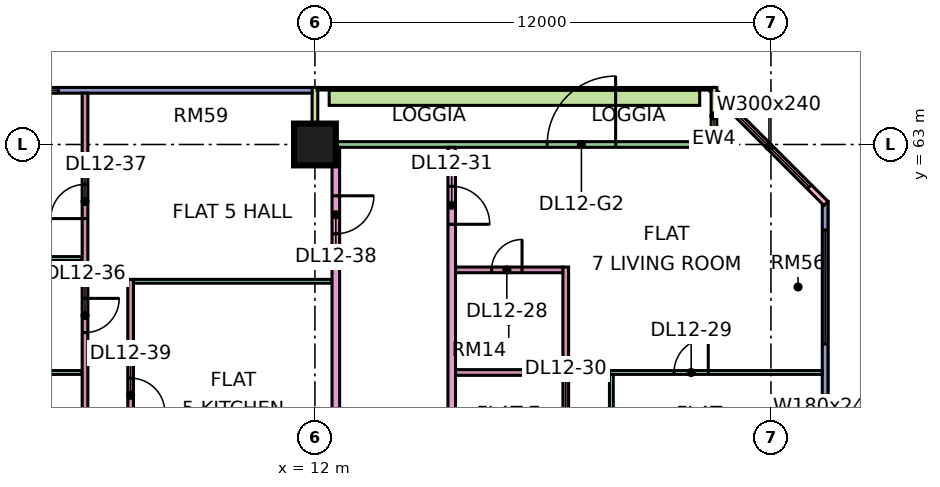
"""IFC4 building model, lengths in metres.
Left out: names, types, materials, properties, quantities, classifications, styles, units other than length and angle.
Written with IfcOpenShell. Run it as: python <this file> out.ifc"""

import sys

from ifc_helpers import new_model, si_unit, direction, frame, frame_2d, origin, origin_2d, place, context, subcontext, project, spatial, rectangle, extrude, element, fill, save


model = new_model("IFC4")
c1 = context("Model", 3, precision=1e-05, world=origin(), true_north=direction((0.0, 1.0)))
c2 = subcontext(c1, "Body", "Model", "MODEL_VIEW")
j1 = project(units=[si_unit("LENGTHUNIT", "METRE"), si_unit("PLANEANGLEUNIT", "RADIAN")], contexts=[c1])
p1 = place(None, origin())
s1 = spatial("IfcSite", under=j1, at=p1, CompositionType="ELEMENT")
p2 = place(p1, origin())
s2 = spatial("IfcBuilding", under=s1, at=p2, CompositionType="ELEMENT")
p3 = place(p2, frame((0.0, 0.0, 60.15)))
s3 = spatial("IfcBuildingStorey", under=s2, at=p3, CompositionType="ELEMENT", Elevation=60.15)
p4 = place(p3, frame((12.0, 63.0, 0.0), z_axis=(0.0, 0.0, 1.0), x_axis=(1.0, 0.0, 0.0)))
e1 = element("IfcColumn", 1, at=p4, inside=s3, PredefinedType="COLUMN", context=c2, shape_type="SweptSolid", body=[
    extrude(rectangle(XDim=1.1, YDim=1.1, at=origin_2d()), origin(), (0.0, 0.0, 1.0), 3.75),
])
p5 = place(p3, frame((25.425, 48.075, 0.0), z_axis=(0.0, 0.0, 1.0), x_axis=(0.0, 1.0, 0.0)))
e2 = element("IfcWall", 2, at=p5, inside=s3, PredefinedType="SOLIDWALL", context=c2, shape_type="SweptSolid", body=[
    extrude(rectangle(XDim=13.425, YDim=0.15, at=frame_2d((6.712, 0.0))), origin(), (0.0, 0.0, 1.0), 3.35),
])
p6 = place(p5, frame((0.562, 0.0, 0.45)))
e3 = element("IfcOpeningElement", 3, at=p6, cuts=e2, PredefinedType="OPENING", context=c2, shape_type="SweptSolid", body=[
    extrude(rectangle(XDim=4.8, YDim=2.4, at=frame_2d((2.4, 1.2))), frame((0.0, 0.085, 0.0), z_axis=(0.0, -1.0, 0.0), x_axis=(1.0, 0.0, 0.0)), (0.0, 0.0, 1.0), 0.17),
])
p7 = place(p5, frame((6.525, 0.0, 0.45)))
e4 = element("IfcOpeningElement", 4, at=p7, cuts=e2, PredefinedType="OPENING", context=c2, shape_type="SweptSolid", body=[
    extrude(rectangle(XDim=1.8, YDim=2.4, at=frame_2d((0.9, 1.2))), frame((0.0, 0.085, 0.0), z_axis=(0.0, -1.0, 0.0), x_axis=(1.0, 0.0, 0.0)), (0.0, 0.0, 1.0), 0.17),
])
p8 = place(p5, frame((9.675, 0.0, 0.45)))
e5 = element("IfcOpeningElement", 5, at=p8, cuts=e2, PredefinedType="OPENING", context=c2, shape_type="SweptSolid", body=[
    extrude(rectangle(XDim=3.0, YDim=2.4, at=frame_2d((1.5, 1.2))), frame((0.0, 0.085, 0.0), z_axis=(0.0, -1.0, 0.0), x_axis=(1.0, 0.0, 0.0)), (0.0, 0.0, 1.0), 0.17),
])
p9 = place(p3, frame((25.447, 61.447, 0.0), z_axis=(0.0, 0.0, 1.0), x_axis=(-0.707106781187, 0.707106781187, 0.0)))
e6 = element("IfcWall", 6, at=p9, inside=s3, PredefinedType="SOLIDWALL", context=c2, shape_type="SweptSolid", body=[
    extrude(rectangle(XDim=4.243, YDim=0.15, at=frame_2d((2.121, 0.0))), origin(), (0.0, 0.0, 1.0), 3.35),
])
p10 = place(p9, frame((0.621, 0.0, 0.45)))
e7 = element("IfcOpeningElement", 7, at=p10, cuts=e6, PredefinedType="OPENING", context=c2, shape_type="SweptSolid", body=[
    extrude(rectangle(XDim=3.0, YDim=2.4, at=frame_2d((1.5, 1.2))), frame((0.0, 0.085, 0.0), z_axis=(0.0, -1.0, 0.0), x_axis=(1.0, 0.0, 0.0)), (0.0, 0.0, 1.0), 0.17),
])
p11 = place(p3, frame((22.425, 63.0, 0.0), z_axis=(0.0, 0.0, 1.0), x_axis=(-1.0, 0.0, 0.0)))
e8 = element("IfcWall", 8, at=p11, inside=s3, PredefinedType="SOLIDWALL", context=c2, shape_type="SweptSolid", body=[
    extrude(rectangle(XDim=10.35, YDim=0.15, at=frame_2d((5.175, 0.0))), origin(), (0.0, 0.0, 1.0), 3.35),
])
p12 = place(p11, frame((2.512, 0.0, 0.0)))
e9 = element("IfcOpeningElement", 9, at=p12, cuts=e8, PredefinedType="OPENING", context=c2, shape_type="SweptSolid", body=[
    extrude(rectangle(XDim=1.8, YDim=2.4, at=frame_2d((0.9, 1.2))), frame((0.0, 0.085, 0.0), z_axis=(0.0, -1.0, 0.0), x_axis=(1.0, 0.0, 0.0)), (0.0, 0.0, 1.0), 0.17),
])
for number, where, z_axis, x_axis in (
    (10, (22.5, 64.5, 0.0), (0.0, 0.0, 1.0), (0.0, -1.0, 0.0)),
    (11, (12.0, 64.5, 0.0), (0.0, 0.0, 1.0), (0.0, -1.0, 0.0)),
):
    element("IfcWall", number, at=place(p3, frame(where, z_axis=z_axis, x_axis=x_axis)), inside=s3, PredefinedType="SOLIDWALL", context=c2, shape_type="SweptSolid", body=[
        extrude(rectangle(XDim=1.5, YDim=0.15, at=frame_2d((0.75, 0.0))), origin(), (0.0, 0.0, 1.0), 3.35),
    ])
p13 = place(p3, frame((11.925, 64.425, 0.0), z_axis=(0.0, 0.0, 1.0), x_axis=(-1.0, 0.0, 0.0)))
e12 = element("IfcWall", 12, at=p13, inside=s3, PredefinedType="SOLIDWALL", context=c2, shape_type="SweptSolid", body=[
    extrude(rectangle(XDim=10.425, YDim=0.15, at=frame_2d((5.212, 0.0))), origin(), (0.0, 0.0, 1.0), 3.35),
])
p14 = place(p13, frame((6.675, 0.0, 0.45)))
e13 = element("IfcOpeningElement", 13, at=p14, cuts=e12, PredefinedType="OPENING", context=c2, shape_type="SweptSolid", body=[
    extrude(rectangle(XDim=3.0, YDim=2.4, at=frame_2d((1.5, 1.2))), frame((0.0, 0.085, 0.0), z_axis=(0.0, -1.0, 0.0), x_axis=(1.0, 0.0, 0.0)), (0.0, 0.0, 1.0), 0.17),
])
p15 = place(p3, frame((22.125, 64.229, 0.0), z_axis=(0.0, 0.0, 1.0), x_axis=(-1.0, 0.0, 0.0)))
e14 = element("IfcWall", 14, at=p15, inside=s3, PredefinedType="SOLIDWALL", context=c2, shape_type="SweptSolid", body=[
    extrude(rectangle(XDim=9.75, YDim=0.4, at=frame_2d((4.875, 0.0))), origin(), (0.0, 0.0, 1.0), 0.7),
])
for number, where, z_axis, x_axis in (
    (15, (-1.351, 57.0, 0.0), (0.0, 0.0, 1.0), (1.0, 0.0, 0.0)),
    (16, (-1.351, 60.0, 0.0), (0.0, 0.0, 1.0), (1.0, 0.0, 0.0)),
):
    element("IfcWall", number, at=place(p3, frame(where, z_axis=z_axis, x_axis=x_axis)), inside=s3, PredefinedType="PARTITIONING", context=c2, shape_type="SweptSolid", body=[
        extrude(rectangle(XDim=7.226, YDim=0.1, at=frame_2d((3.613, 0.0))), origin(), (0.0, 0.0, 1.0), 3.35),
    ])
p16 = place(p3, frame((5.95, 36.1, 0.0), z_axis=(0.0, 0.0, 1.0), x_axis=(0.0, 1.0, 0.0)))
e17 = element("IfcWall", 17, at=p16, inside=s3, PredefinedType="PARTITIONING", context=c2, shape_type="SweptSolid", body=[
    extrude(rectangle(XDim=28.25, YDim=0.15, at=frame_2d((14.125, 0.0))), origin(), (0.0, 0.0, 1.0), 3.35),
])
p17 = place(p16, frame((3.95, 0.0, 0.0)))
e18 = element("IfcOpeningElement", 18, at=p17, cuts=e17, PredefinedType="OPENING", context=c2, shape_type="SweptSolid", body=[
    extrude(rectangle(XDim=0.9, YDim=2.1, at=frame_2d((0.45, 1.05))), frame((0.0, 0.085, 0.0), z_axis=(0.0, -1.0, 0.0), x_axis=(1.0, 0.0, 0.0)), (0.0, 0.0, 1.0), 0.17),
])
p18 = place(p16, frame((12.95, 0.0, 0.0)))
e19 = element("IfcOpeningElement", 19, at=p18, cuts=e17, PredefinedType="OPENING", context=c2, shape_type="SweptSolid", body=[
    extrude(rectangle(XDim=0.9, YDim=2.1, at=frame_2d((0.45, 1.05))), frame((0.0, 0.085, 0.0), z_axis=(0.0, -1.0, 0.0), x_axis=(1.0, 0.0, 0.0)), (0.0, 0.0, 1.0), 0.17),
])
p19 = place(p16, frame((18.95, 0.0, 0.0)))
e20 = element("IfcOpeningElement", 20, at=p19, cuts=e17, PredefinedType="OPENING", context=c2, shape_type="SweptSolid", body=[
    extrude(rectangle(XDim=0.9, YDim=2.1, at=frame_2d((0.45, 1.05))), frame((0.0, 0.085, 0.0), z_axis=(0.0, -1.0, 0.0), x_axis=(1.0, 0.0, 0.0)), (0.0, 0.0, 1.0), 0.17),
])
p20 = place(p16, frame((21.95, 0.0, 0.0)))
e21 = element("IfcOpeningElement", 21, at=p20, cuts=e17, PredefinedType="OPENING", context=c2, shape_type="SweptSolid", body=[
    extrude(rectangle(XDim=0.9, YDim=2.1, at=frame_2d((0.45, 1.05))), frame((0.0, 0.085, 0.0), z_axis=(0.0, -1.0, 0.0), x_axis=(1.0, 0.0, 0.0)), (0.0, 0.0, 1.0), 0.17),
])
p21 = place(p16, frame((24.95, 0.0, 0.0)))
e22 = element("IfcOpeningElement", 22, at=p21, cuts=e17, PredefinedType="OPENING", context=c2, shape_type="SweptSolid", body=[
    extrude(rectangle(XDim=0.9, YDim=2.1, at=frame_2d((0.45, 1.05))), frame((0.0, 0.085, 0.0), z_axis=(0.0, -1.0, 0.0), x_axis=(1.0, 0.0, 0.0)), (0.0, 0.0, 1.0), 0.17),
])
p22 = place(p16, frame((15.95, 0.0, 0.0)))
e23 = element("IfcOpeningElement", 23, at=p22, cuts=e17, PredefinedType="OPENING", context=c2, shape_type="SweptSolid", body=[
    extrude(rectangle(XDim=0.9, YDim=2.1, at=frame_2d((0.45, 1.05))), frame((0.0, 0.085, 0.0), z_axis=(0.0, -1.0, 0.0), x_axis=(1.0, 0.0, 0.0)), (0.0, 0.0, 1.0), 0.17),
])
p23 = place(p16, frame((10.8, 0.0, 0.0)))
e24 = element("IfcOpeningElement", 24, at=p23, cuts=e17, PredefinedType="OPENING", context=c2, shape_type="SweptSolid", body=[
    extrude(rectangle(XDim=0.8, YDim=2.1, at=frame_2d((0.4, 1.05))), frame((0.0, 0.085, 0.0), z_axis=(0.0, -1.0, 0.0), x_axis=(1.0, 0.0, 0.0)), (0.0, 0.0, 1.0), 0.17),
])
p24 = place(p16, frame((0.55, 0.0, 0.0)))
e25 = element("IfcOpeningElement", 25, at=p24, cuts=e17, PredefinedType="OPENING", context=c2, shape_type="SweptSolid", body=[
    extrude(rectangle(XDim=1.6, YDim=2.1, at=frame_2d((0.8, 1.05))), frame((0.0, 0.085, 0.0), z_axis=(0.0, -1.0, 0.0), x_axis=(1.0, 0.0, 0.0)), (0.0, 0.0, 1.0), 0.17),
])
p25 = place(p16, frame((6.95, 0.0, 0.0)))
e26 = element("IfcOpeningElement", 26, at=p25, cuts=e17, PredefinedType="OPENING", context=c2, shape_type="SweptSolid", body=[
    extrude(rectangle(XDim=0.9, YDim=2.1, at=frame_2d((0.45, 1.05))), frame((0.0, 0.085, 0.0), z_axis=(0.0, -1.0, 0.0), x_axis=(1.0, 0.0, 0.0)), (0.0, 0.0, 1.0), 0.17),
])
p26 = place(p3, frame((7.15, 36.1, 0.0), z_axis=(0.0, 0.0, 1.0), x_axis=(0.0, 1.0, 0.0)))
e27 = element("IfcWall", 27, at=p26, inside=s3, PredefinedType="PARTITIONING", context=c2, shape_type="SweptSolid", body=[
    extrude(rectangle(XDim=23.35, YDim=0.15, at=frame_2d((11.675, 0.0))), origin(), (0.0, 0.0, 1.0), 3.35),
])
p27 = place(p26, frame((10.25, 0.0, 0.0)))
e28 = element("IfcOpeningElement", 28, at=p27, cuts=e27, PredefinedType="OPENING", context=c2, shape_type="SweptSolid", body=[
    extrude(rectangle(XDim=0.8, YDim=2.1, at=frame_2d((0.4, 1.05))), frame((0.0, 0.085, 0.0), z_axis=(0.0, -1.0, 0.0), x_axis=(1.0, 0.0, 0.0)), (0.0, 0.0, 1.0), 0.17),
])
p28 = place(p26, frame((19.85, 0.0, 0.0)))
e29 = element("IfcOpeningElement", 29, at=p28, cuts=e27, PredefinedType="OPENING", context=c2, shape_type="SweptSolid", body=[
    extrude(rectangle(XDim=0.9, YDim=2.1, at=frame_2d((0.45, 1.05))), frame((0.0, 0.085, 0.0), z_axis=(0.0, -1.0, 0.0), x_axis=(1.0, 0.0, 0.0)), (0.0, 0.0, 1.0), 0.17),
])
p29 = place(p26, frame((3.65, 0.0, 0.0)))
e30 = element("IfcOpeningElement", 30, at=p29, cuts=e27, PredefinedType="OPENING", context=c2, shape_type="SweptSolid", body=[
    extrude(rectangle(XDim=0.8, YDim=2.1, at=frame_2d((0.4, 1.05))), frame((0.0, 0.085, 0.0), z_axis=(0.0, -1.0, 0.0), x_axis=(1.0, 0.0, 0.0)), (0.0, 0.0, 1.0), 0.17),
])
p30 = place(p26, frame((13.25, 0.0, 0.0)))
e31 = element("IfcOpeningElement", 31, at=p30, cuts=e27, PredefinedType="OPENING", context=c2, shape_type="SweptSolid", body=[
    extrude(rectangle(XDim=0.8, YDim=2.1, at=frame_2d((0.4, 1.05))), frame((0.0, 0.085, 0.0), z_axis=(0.0, -1.0, 0.0), x_axis=(1.0, 0.0, 0.0)), (0.0, 0.0, 1.0), 0.17),
])
p31 = place(p26, frame((15.65, 0.0, 0.0)))
e32 = element("IfcOpeningElement", 32, at=p31, cuts=e27, PredefinedType="OPENING", context=c2, shape_type="SweptSolid", body=[
    extrude(rectangle(XDim=0.8, YDim=2.1, at=frame_2d((0.4, 1.05))), frame((0.0, 0.085, 0.0), z_axis=(0.0, -1.0, 0.0), x_axis=(1.0, 0.0, 0.0)), (0.0, 0.0, 1.0), 0.17),
])
p32 = place(p26, frame((0.65, 0.0, 0.0)))
e33 = element("IfcOpeningElement", 33, at=p32, cuts=e27, PredefinedType="OPENING", context=c2, shape_type="SweptSolid", body=[
    extrude(rectangle(XDim=0.9, YDim=2.1, at=frame_2d((0.45, 1.05))), frame((0.0, 0.085, 0.0), z_axis=(0.0, -1.0, 0.0), x_axis=(1.0, 0.0, 0.0)), (0.0, 0.0, 1.0), 0.17),
])
p33 = place(p26, frame((6.95, 0.0, 0.0)))
e34 = element("IfcOpeningElement", 34, at=p33, cuts=e27, PredefinedType="OPENING", context=c2, shape_type="SweptSolid", body=[
    extrude(rectangle(XDim=0.8, YDim=2.1, at=frame_2d((0.4, 1.05))), frame((0.0, 0.085, 0.0), z_axis=(0.0, -1.0, 0.0), x_axis=(1.0, 0.0, 0.0)), (0.0, 0.0, 1.0), 0.17),
])
p34 = place(p3, frame((7.225, 59.4, 0.0), z_axis=(0.0, 0.0, 1.0), x_axis=(1.0, 0.0, 0.0)))
e35 = element("IfcWall", 35, at=p34, inside=s3, PredefinedType="PARTITIONING", context=c2, shape_type="SweptSolid", body=[
    extrude(rectangle(XDim=5.225, YDim=0.1, at=frame_2d((2.612, 0.0))), origin(), (0.0, 0.0, 1.0), 3.35),
])
p35 = place(p3, frame((12.55, 20.0, 0.0), z_axis=(0.0, 0.0, 1.0), x_axis=(0.0, 1.0, 0.0)))
e36 = element("IfcWall", 36, at=p35, inside=s3, PredefinedType="PARTITIONING", context=c2, shape_type="SweptSolid", body=[
    extrude(rectangle(XDim=42.926, YDim=0.2, at=frame_2d((21.463, 0.0))), origin(), (0.0, 0.0, 1.0), 3.35),
])
p36 = place(p35, frame((40.65, 0.0, 0.0)))
e37 = element("IfcOpeningElement", 37, at=p36, cuts=e36, PredefinedType="OPENING", context=c2, shape_type="SweptSolid", body=[
    extrude(rectangle(XDim=1.0, YDim=2.1, at=frame_2d((0.5, 1.05))), frame((0.0, 0.11, 0.0), z_axis=(0.0, -1.0, 0.0), x_axis=(1.0, 0.0, 0.0)), (0.0, 0.0, 1.0), 0.22),
])
p37 = place(p35, frame((0.6, 0.0, 0.0)))
e38 = element("IfcOpeningElement", 38, at=p37, cuts=e36, PredefinedType="OPENING", context=c2, shape_type="SweptSolid", body=[
    extrude(rectangle(XDim=1.2, YDim=2.1, at=frame_2d((0.6, 1.05))), frame((0.0, 0.11, 0.0), z_axis=(0.0, -1.0, 0.0), x_axis=(1.0, 0.0, 0.0)), (0.0, 0.0, 1.0), 0.22),
])
p38 = place(p35, frame((14.1, 0.0, 0.0)))
e39 = element("IfcOpeningElement", 39, at=p38, cuts=e36, PredefinedType="OPENING", context=c2, shape_type="SweptSolid", body=[
    extrude(rectangle(XDim=1.0, YDim=2.1, at=frame_2d((0.5, 1.05))), frame((0.0, 0.11, 0.0), z_axis=(0.0, -1.0, 0.0), x_axis=(1.0, 0.0, 0.0)), (0.0, 0.0, 1.0), 0.22),
])
p39 = place(p3, frame((15.6, 51.225, 0.0), z_axis=(0.0, 0.0, 1.0), x_axis=(0.0, 1.0, 0.0)))
e40 = element("IfcWall", 40, at=p39, inside=s3, PredefinedType="PARTITIONING", context=c2, shape_type="SweptSolid", body=[
    extrude(rectangle(XDim=11.701, YDim=0.2, at=frame_2d((5.851, 0.0))), origin(), (0.0, 0.0, 1.0), 3.35),
])
p40 = place(p39, frame((9.675, 0.0, 0.0)))
e41 = element("IfcOpeningElement", 41, at=p40, cuts=e40, PredefinedType="OPENING", context=c2, shape_type="SweptSolid", body=[
    extrude(rectangle(XDim=1.0, YDim=2.1, at=frame_2d((0.5, 1.05))), frame((0.0, 0.11, 0.0), z_axis=(0.0, -1.0, 0.0), x_axis=(1.0, 0.0, 0.0)), (0.0, 0.0, 1.0), 0.22),
])
p41 = place(p3, frame((15.7, 57.0, 0.0), z_axis=(0.0, 0.0, 1.0), x_axis=(1.0, 0.0, 0.0)))
e42 = element("IfcWall", 42, at=p41, inside=s3, PredefinedType="PARTITIONING", context=c2, shape_type="SweptSolid", body=[
    extrude(rectangle(XDim=2.825, YDim=0.15, at=frame_2d((1.413, 0.0))), origin(), (0.0, 0.0, 1.0), 3.35),
])
p42 = place(p3, frame((15.7, 59.7, 0.0), z_axis=(0.0, 0.0, 1.0), x_axis=(1.0, 0.0, 0.0)))
e43 = element("IfcWall", 43, at=p42, inside=s3, PredefinedType="PARTITIONING", context=c2, shape_type="SweptSolid", body=[
    extrude(rectangle(XDim=2.825, YDim=0.15, at=frame_2d((1.413, 0.0))), origin(), (0.0, 0.0, 1.0), 3.35),
])
p43 = place(p42, frame((0.95, 0.0, 0.0)))
e44 = element("IfcOpeningElement", 44, at=p43, cuts=e43, PredefinedType="OPENING", context=c2, shape_type="SweptSolid", body=[
    extrude(rectangle(XDim=0.8, YDim=2.1, at=frame_2d((0.4, 1.05))), frame((0.0, 0.085, 0.0), z_axis=(0.0, -1.0, 0.0), x_axis=(1.0, 0.0, 0.0)), (0.0, 0.0, 1.0), 0.17),
])
p44 = place(p3, frame((18.6, 54.1, 0.0), z_axis=(0.0, 0.0, 1.0), x_axis=(0.0, 1.0, 0.0)))
e45 = element("IfcWall", 45, at=p44, inside=s3, PredefinedType="PARTITIONING", context=c2, shape_type="SweptSolid", body=[
    extrude(rectangle(XDim=5.675, YDim=0.15, at=frame_2d((2.837, 0.0))), origin(), (0.0, 0.0, 1.0), 3.35),
])
p45 = place(p44, frame((0.95, 0.0, 0.0)))
e46 = element("IfcOpeningElement", 46, at=p45, cuts=e45, PredefinedType="OPENING", context=c2, shape_type="SweptSolid", body=[
    extrude(rectangle(XDim=0.9, YDim=2.1, at=frame_2d((0.45, 1.05))), frame((0.0, 0.085, 0.0), z_axis=(0.0, -1.0, 0.0), x_axis=(1.0, 0.0, 0.0)), (0.0, 0.0, 1.0), 0.17),
])
p46 = place(p3, frame((19.75, 57.0, 0.0), z_axis=(0.0, 0.0, 1.0), x_axis=(1.0, 0.0, 0.0)))
e47 = element("IfcWall", 47, at=p46, inside=s3, PredefinedType="PARTITIONING", context=c2, shape_type="SweptSolid", body=[
    extrude(rectangle(XDim=5.6, YDim=0.1, at=frame_2d((2.8, 0.0))), origin(), (0.0, 0.0, 1.0), 3.35),
])
p47 = place(p46, frame((1.7, 0.0, 0.0)))
e48 = element("IfcOpeningElement", 48, at=p47, cuts=e47, PredefinedType="OPENING", context=c2, shape_type="SweptSolid", body=[
    extrude(rectangle(XDim=0.9, YDim=2.1, at=frame_2d((0.45, 1.05))), frame((0.0, 0.06, 0.0), z_axis=(0.0, -1.0, 0.0), x_axis=(1.0, 0.0, 0.0)), (0.0, 0.0, 1.0), 0.12),
])
p48 = place(p3, frame((19.8, 54.1, 0.0), z_axis=(0.0, 0.0, 1.0), x_axis=(0.0, 1.0, 0.0)))
e49 = element("IfcWall", 49, at=p48, inside=s3, PredefinedType="PARTITIONING", context=c2, shape_type="SweptSolid", body=[
    extrude(rectangle(XDim=2.85, YDim=0.1, at=frame_2d((1.425, 0.0))), origin(), (0.0, 0.0, 1.0), 3.35),
])
p49 = place(p7, origin())
e50 = element("IfcWindow", 50, at=p49, inside=s3, PartitioningType="SINGLE_PANEL", PredefinedType="WINDOW", context=c2, shape_type="SweptSolid", body=[
    extrude(rectangle(XDim=1.8, YDim=2.4, at=frame_2d((0.9, 1.2))), frame((0.0, 0.03, 0.0), z_axis=(0.0, -1.0, 0.0), x_axis=(1.0, 0.0, 0.0)), (0.0, 0.0, 1.0), 0.06),
])
fill(e4, e50)
p50 = place(p8, origin())
e51 = element("IfcWindow", 51, at=p50, inside=s3, PartitioningType="SINGLE_PANEL", PredefinedType="WINDOW", context=c2, shape_type="SweptSolid", body=[
    extrude(rectangle(XDim=3.0, YDim=2.4, at=frame_2d((1.5, 1.2))), frame((0.0, 0.03, 0.0), z_axis=(0.0, -1.0, 0.0), x_axis=(1.0, 0.0, 0.0)), (0.0, 0.0, 1.0), 0.06),
])
fill(e5, e51)
p51 = place(p10, origin())
e52 = element("IfcWindow", 52, at=p51, inside=s3, PartitioningType="SINGLE_PANEL", PredefinedType="WINDOW", context=c2, shape_type="SweptSolid", body=[
    extrude(rectangle(XDim=3.0, YDim=2.4, at=frame_2d((1.5, 1.2))), frame((0.0, 0.03, 0.0), z_axis=(0.0, -1.0, 0.0), x_axis=(1.0, 0.0, 0.0)), (0.0, 0.0, 1.0), 0.06),
])
fill(e7, e52)
p52 = place(p12, frame((1.8, 0.0, 0.0), z_axis=(0.0, 0.0, 1.0), x_axis=(-1.0, 0.0, 0.0)))
e53 = element("IfcDoor", 53, at=p52, inside=s3, OperationType="DOUBLE_DOOR_SINGLE_SWING", PredefinedType="DOOR", context=c2, shape_type="SweptSolid", body=[
    extrude(rectangle(XDim=1.8, YDim=2.4, at=frame_2d((0.9, 1.2))), frame((0.0, 0.025, 0.0), z_axis=(0.0, -1.0, 0.0), x_axis=(1.0, 0.0, 0.0)), (0.0, 0.0, 1.0), 0.05),
])
fill(e9, e53)
p53 = place(p14, origin())
e54 = element("IfcWindow", 54, at=p53, inside=s3, PartitioningType="SINGLE_PANEL", PredefinedType="WINDOW", context=c2, shape_type="SweptSolid", body=[
    extrude(rectangle(XDim=3.0, YDim=2.4, at=frame_2d((1.5, 1.2))), frame((0.0, 0.03, 0.0), z_axis=(0.0, -1.0, 0.0), x_axis=(1.0, 0.0, 0.0)), (0.0, 0.0, 1.0), 0.06),
])
fill(e13, e54)
p54 = place(p43, frame((0.8, 0.0, 0.0), z_axis=(0.0, 0.0, 1.0), x_axis=(-1.0, 0.0, 0.0)))
e55 = element("IfcDoor", 55, at=p54, inside=s3, OperationType="SINGLE_SWING_RIGHT", PredefinedType="DOOR", context=c2, shape_type="SweptSolid", body=[
    extrude(rectangle(XDim=0.8, YDim=2.1, at=frame_2d((0.4, 1.05))), frame((0.0, 0.025, 0.0), z_axis=(0.0, -1.0, 0.0), x_axis=(1.0, 0.0, 0.0)), (0.0, 0.0, 1.0), 0.05),
])
fill(e44, e55)
p55 = place(p47, frame((0.9, 0.0, 0.0), z_axis=(0.0, 0.0, 1.0), x_axis=(-1.0, 0.0, 0.0)))
e56 = element("IfcDoor", 56, at=p55, inside=s3, OperationType="SINGLE_SWING_RIGHT", PredefinedType="DOOR", context=c2, shape_type="SweptSolid", body=[
    extrude(rectangle(XDim=0.9, YDim=2.1, at=frame_2d((0.45, 1.05))), frame((0.0, 0.025, 0.0), z_axis=(0.0, -1.0, 0.0), x_axis=(1.0, 0.0, 0.0)), (0.0, 0.0, 1.0), 0.05),
])
fill(e48, e56)
p56 = place(p40, frame((1.0, 0.0, 0.0), z_axis=(0.0, 0.0, 1.0), x_axis=(-1.0, 0.0, 0.0)))
e57 = element("IfcDoor", 57, at=p56, inside=s3, OperationType="SINGLE_SWING_LEFT", PredefinedType="DOOR", context=c2, shape_type="SweptSolid", body=[
    extrude(rectangle(XDim=1.0, YDim=2.1, at=frame_2d((0.5, 1.05))), frame((0.0, 0.025, 0.0), z_axis=(0.0, -1.0, 0.0), x_axis=(1.0, 0.0, 0.0)), (0.0, 0.0, 1.0), 0.05),
])
fill(e41, e57)
p57 = place(p20, origin())
e58 = element("IfcDoor", 58, at=p57, inside=s3, OperationType="SINGLE_SWING_RIGHT", PredefinedType="DOOR", context=c2, shape_type="SweptSolid", body=[
    extrude(rectangle(XDim=0.9, YDim=2.1, at=frame_2d((0.45, 1.05))), frame((0.0, 0.025, 0.0), z_axis=(0.0, -1.0, 0.0), x_axis=(1.0, 0.0, 0.0)), (0.0, 0.0, 1.0), 0.05),
])
fill(e21, e58)
p58 = place(p21, origin())
e59 = element("IfcDoor", 59, at=p58, inside=s3, OperationType="SINGLE_SWING_LEFT", PredefinedType="DOOR", context=c2, shape_type="SweptSolid", body=[
    extrude(rectangle(XDim=0.9, YDim=2.1, at=frame_2d((0.45, 1.05))), frame((0.0, 0.025, 0.0), z_axis=(0.0, -1.0, 0.0), x_axis=(1.0, 0.0, 0.0)), (0.0, 0.0, 1.0), 0.05),
])
fill(e22, e59)
p59 = place(p36, origin())
e60 = element("IfcDoor", 60, at=p59, inside=s3, OperationType="SINGLE_SWING_RIGHT", PredefinedType="DOOR", context=c2, shape_type="SweptSolid", body=[
    extrude(rectangle(XDim=1.0, YDim=2.1, at=frame_2d((0.5, 1.05))), frame((0.0, 0.025, 0.0), z_axis=(0.0, -1.0, 0.0), x_axis=(1.0, 0.0, 0.0)), (0.0, 0.0, 1.0), 0.05),
])
fill(e37, e60)
p60 = place(p28, frame((0.9, 0.0, 0.0), z_axis=(0.0, 0.0, 1.0), x_axis=(-1.0, 0.0, 0.0)))
e61 = element("IfcDoor", 61, at=p60, inside=s3, OperationType="SINGLE_SWING_LEFT", PredefinedType="DOOR", context=c2, shape_type="SweptSolid", body=[
    extrude(rectangle(XDim=0.9, YDim=2.1, at=frame_2d((0.45, 1.05))), frame((0.0, 0.025, 0.0), z_axis=(0.0, -1.0, 0.0), x_axis=(1.0, 0.0, 0.0)), (0.0, 0.0, 1.0), 0.05),
])
fill(e29, e61)
save(model, sys.argv[1])
